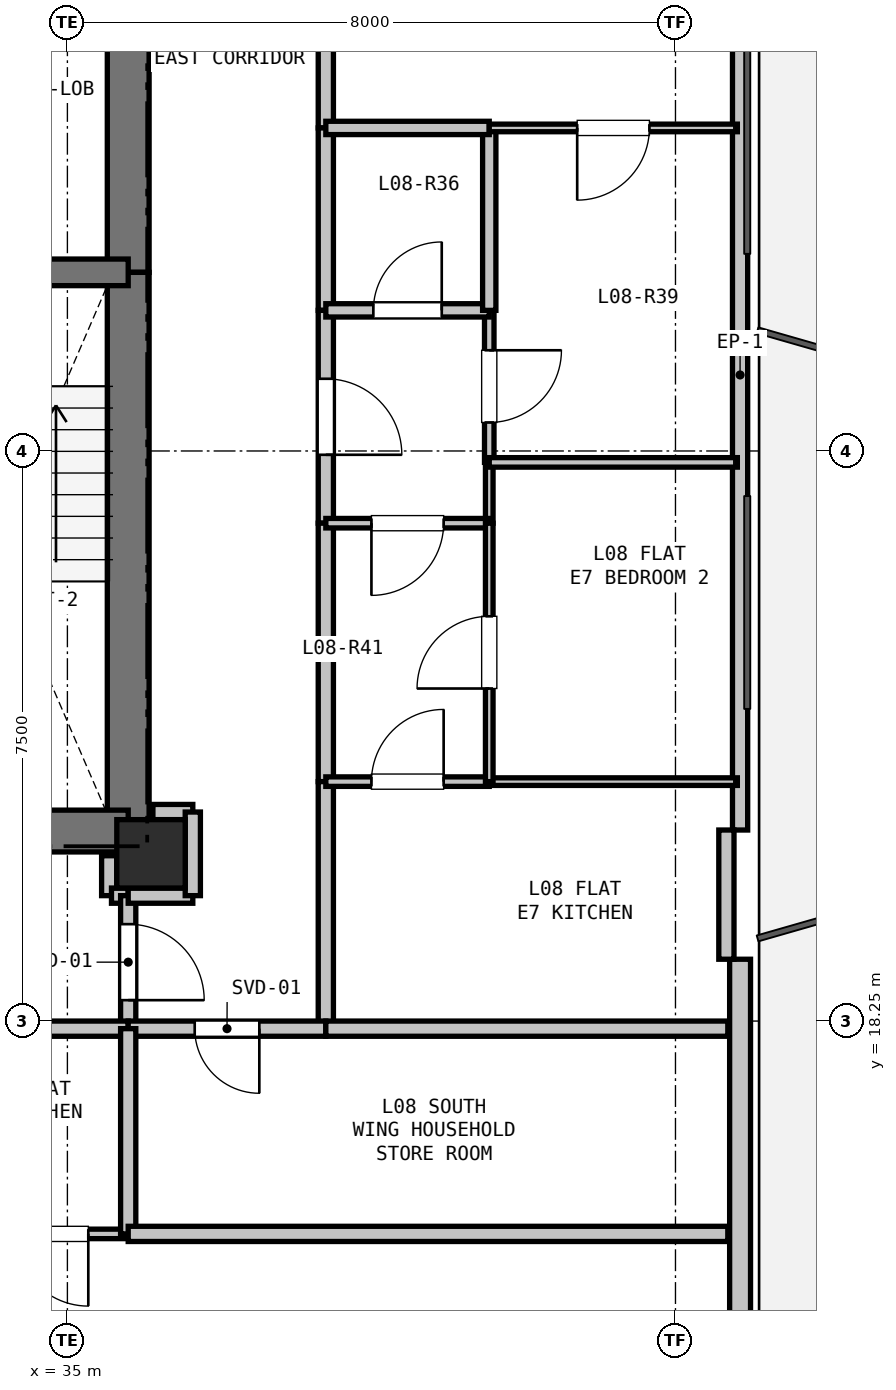
"""IFC4 building model, lengths in metres.
Left out: names, types, materials, properties, quantities, classifications, styles, units other than length and angle.
Written with IfcOpenShell. Run it as: python <this file> out.ifc"""

import sys

from ifc_helpers import new_model, si_unit, direction, frame, frame_2d, origin, origin_2d, place, context, subcontext, project, spatial, rectangle, extrude, element, fill, save


model = new_model("IFC4")
c1 = context("Model", 3, precision=1e-05, world=origin(), true_north=direction((0.0, 1.0)))
c2 = subcontext(c1, "Body", "Model", "MODEL_VIEW")
j1 = project(units=[si_unit("LENGTHUNIT", "METRE"), si_unit("PLANEANGLEUNIT", "RADIAN")], contexts=[c1])
p1 = place(None, origin())
s1 = spatial("IfcSite", under=j1, at=p1, CompositionType="ELEMENT")
p2 = place(p1, origin())
s2 = spatial("IfcBuilding", under=s1, at=p2, CompositionType="ELEMENT")
p3 = place(p2, frame((0.0, 0.0, 32.4)))
s3 = spatial("IfcBuildingStorey", under=s2, at=p3, CompositionType="ELEMENT", Elevation=32.4)
p4 = place(p3, frame((36.1, 20.45, 0.0), z_axis=(0.0, 0.0, 1.0), x_axis=(1.0, 0.0, 0.0)))
e1 = element("IfcColumn", 1, at=p4, inside=s3, PredefinedType="COLUMN", context=c2, shape_type="SweptSolid", body=[
    extrude(rectangle(XDim=0.9, YDim=0.9, at=origin_2d()), origin(), (0.0, 0.0, 1.0), 3.3),
])
p5 = place(p3, frame((43.85, 32.737, 0.0), z_axis=(0.0, 0.0, 1.0), x_axis=(0.0, -1.0, 0.0)))
e2 = element("IfcWall", 2, at=p5, inside=s3, PredefinedType="PARAPET", context=c2, shape_type="SweptSolid", body=[
    extrude(rectangle(XDim=11.973, YDim=0.2, at=frame_2d((5.987, 0.0))), origin(), (0.0, 0.0, 1.0), 0.2),
])
p6 = place(p3, frame((43.85, 19.063, 0.0), z_axis=(0.0, 0.0, 1.0), x_axis=(0.0, -1.0, 0.0)))
e3 = element("IfcWall", 3, at=p6, inside=s3, PredefinedType="SOLIDWALL", context=c2, shape_type="SweptSolid", body=[
    extrude(rectangle(XDim=12.673, YDim=0.275, at=frame_2d((6.336, 0.0))), origin(), (0.0, 0.0, 1.0), 2.66),
])
p7 = place(p3, frame((43.67, 20.763, 0.0), z_axis=(0.0, 0.0, 1.0), x_axis=(0.0, -1.0, 0.0)))
e4 = element("IfcWall", 4, at=p7, inside=s3, PredefinedType="PARAPET", context=c2, shape_type="SweptSolid", body=[
    extrude(rectangle(XDim=1.7, YDim=0.2, at=frame_2d((0.85, 0.0))), origin(), (0.0, 0.0, 1.0), 2.66),
])
p8 = place(p3, frame((35.8, 32.75, 0.0), z_axis=(0.0, 0.0, 1.0), x_axis=(0.0, -1.0, 0.0)))
e5 = element("IfcWall", 5, at=p8, inside=s3, PredefinedType="SHEAR", context=c2, shape_type="SweptSolid", body=[
    extrude(rectangle(XDim=4.65, YDim=0.55, at=frame_2d((2.325, 0.0))), origin(), (0.0, 0.0, 1.0), 3.04),
])
p9 = place(p3, frame((35.8, 28.1, 0.0), z_axis=(0.0, 0.0, 1.0), x_axis=(0.0, -1.0, 0.0)))
e6 = element("IfcWall", 6, at=p9, inside=s3, PredefinedType="SHEAR", context=c2, shape_type="SweptSolid", body=[
    extrude(rectangle(XDim=7.35, YDim=0.55, at=frame_2d((3.675, 0.0))), origin(), (0.0, 0.0, 1.0), 3.04),
])
p10 = place(p3, frame((35.8, 20.75, 0.0), z_axis=(0.0, 0.0, 1.0), x_axis=(-1.0, 0.0, 0.0)))
e7 = element("IfcWall", 7, at=p10, inside=s3, PredefinedType="SHEAR", context=c2, shape_type="SweptSolid", body=[
    extrude(rectangle(XDim=3.45, YDim=0.55, at=frame_2d((1.725, 0.0))), origin(), (0.0, 0.0, 1.0), 3.04),
])
p11 = place(p3, frame((32.35, 28.1, 0.0), z_axis=(0.0, 0.0, 1.0), x_axis=(1.0, 0.0, 0.0)))
e8 = element("IfcWall", 8, at=p11, inside=s3, PredefinedType="SHEAR", context=c2, shape_type="SweptSolid", body=[
    extrude(rectangle(XDim=3.45, YDim=0.35, at=frame_2d((1.725, 0.0))), origin(), (0.0, 0.0, 1.0), 3.04),
])
p12 = place(p11, frame((1.15, 0.0, 0.0)))
e9 = element("IfcOpeningElement", 9, at=p12, cuts=e8, PredefinedType="OPENING", context=c2, shape_type="SweptSolid", body=[
    extrude(rectangle(XDim=1.15, YDim=2.15, at=frame_2d((0.575, 1.075))), frame((0.0, 0.185, 0.0), z_axis=(0.0, -1.0, 0.0), x_axis=(1.0, 0.0, 0.0)), (0.0, 0.0, 1.0), 0.37),
])
p13 = place(p3, frame((35.55, 20.425, 0.0), z_axis=(0.0, 0.0, 1.0), x_axis=(0.0, -1.0, 0.0)))
e10 = element("IfcWall", 10, at=p13, inside=s3, PredefinedType="PARTITIONING", context=c2, shape_type="SweptSolid", body=[
    extrude(rectangle(XDim=0.525, YDim=0.2, at=frame_2d((0.263, 0.0))), origin(), (0.0, 0.0, 1.0), 2.488),
])
p14 = place(p3, frame((35.58, 19.9, 0.0), z_axis=(0.0, 0.0, 1.0), x_axis=(1.0, 0.0, 0.0)))
e11 = element("IfcWall", 11, at=p14, inside=s3, PredefinedType="PARTITIONING", context=c2, shape_type="SweptSolid", body=[
    extrude(rectangle(XDim=0.22, YDim=0.2, at=frame_2d((0.11, 0.0))), origin(), (0.0, 0.0, 1.0), 3.04),
])
p15 = place(p3, frame((35.8, 19.9, 0.0), z_axis=(0.0, 0.0, 1.0), x_axis=(0.0, -1.0, 0.0)))
e12 = element("IfcWall", 12, at=p15, inside=s3, PredefinedType="PARTITIONING", context=c2, shape_type="SweptSolid", body=[
    extrude(rectangle(XDim=1.75, YDim=0.2, at=frame_2d((0.875, 0.0))), origin(), (0.0, 0.0, 1.0), 3.04),
])
p16 = place(p15, frame((0.375, 0.0, 0.0)))
e13 = element("IfcOpeningElement", 13, at=p16, cuts=e12, PredefinedType="OPENING", context=c2, shape_type="SweptSolid", body=[
    extrude(rectangle(XDim=1.0, YDim=2.15, at=frame_2d((0.5, 1.075))), frame((0.0, 0.11, 0.0), z_axis=(0.0, -1.0, 0.0), x_axis=(1.0, 0.0, 0.0)), (0.0, 0.0, 1.0), 0.22),
])
p17 = place(p3, frame((35.8, 18.15, 0.0), z_axis=(0.0, 0.0, 1.0), x_axis=(-1.0, 0.0, 0.0)))
e14 = element("IfcWall", 14, at=p17, inside=s3, PredefinedType="PARTITIONING", context=c2, shape_type="SweptSolid", body=[
    extrude(rectangle(XDim=3.6, YDim=0.2, at=frame_2d((1.8, 0.0))), origin(), (0.0, 0.0, 1.0), 3.04),
])
p18 = place(p3, frame((36.65, 21.0, 0.0), z_axis=(0.0, 0.0, 1.0), x_axis=(-1.0, 0.0, 0.0)))
e15 = element("IfcWall", 15, at=p18, inside=s3, PredefinedType="PARTITIONING", context=c2, shape_type="SweptSolid", body=[
    extrude(rectangle(XDim=0.525, YDim=0.2, at=frame_2d((0.262, 0.0))), origin(), (0.0, 0.0, 1.0), 2.488),
])
p19 = place(p3, frame((38.4, 35.35, 0.0), z_axis=(0.0, 0.0, 1.0), x_axis=(0.0, -1.0, 0.0)))
e16 = element("IfcWall", 16, at=p19, inside=s3, PredefinedType="PARTITIONING", context=c2, shape_type="SweptSolid", body=[
    extrude(rectangle(XDim=5.35, YDim=0.2, at=frame_2d((2.675, 0.0))), origin(), (0.0, 0.0, 1.0), 2.338),
])
p20 = place(p3, frame((38.4, 30.0, 0.0), z_axis=(0.0, 0.0, 1.0), x_axis=(0.0, -1.0, 0.0)))
e17 = element("IfcWall", 17, at=p20, inside=s3, PredefinedType="PARTITIONING", context=c2, shape_type="SweptSolid", body=[
    extrude(rectangle(XDim=2.4, YDim=0.2, at=frame_2d((1.2, 0.0))), origin(), (0.0, 0.0, 1.0), 3.04),
])
p21 = place(p3, frame((38.4, 27.6, 0.0), z_axis=(0.0, 0.0, 1.0), x_axis=(0.0, -1.0, 0.0)))
e18 = element("IfcWall", 18, at=p21, inside=s3, PredefinedType="PARTITIONING", context=c2, shape_type="SweptSolid", body=[
    extrude(rectangle(XDim=2.8, YDim=0.2, at=frame_2d((1.4, 0.0))), origin(), (0.0, 0.0, 1.0), 3.04),
])
p22 = place(p21, frame((0.9, 0.0, 0.0)))
e19 = element("IfcOpeningElement", 19, at=p22, cuts=e18, PredefinedType="OPENING", context=c2, shape_type="SweptSolid", body=[
    extrude(rectangle(XDim=1.0, YDim=2.15, at=frame_2d((0.5, 1.075))), frame((0.0, 0.11, 0.0), z_axis=(0.0, -1.0, 0.0), x_axis=(1.0, 0.0, 0.0)), (0.0, 0.0, 1.0), 0.22),
])
p23 = place(p3, frame((38.4, 24.8, 0.0), z_axis=(0.0, 0.0, 1.0), x_axis=(0.0, -1.0, 0.0)))
e20 = element("IfcWall", 20, at=p23, inside=s3, PredefinedType="PARTITIONING", context=c2, shape_type="SweptSolid", body=[
    extrude(rectangle(XDim=3.4, YDim=0.2, at=frame_2d((1.7, 0.0))), origin(), (0.0, 0.0, 1.0), 3.04),
])
p24 = place(p3, frame((38.4, 21.4, 0.0), z_axis=(0.0, 0.0, 1.0), x_axis=(0.0, -1.0, 0.0)))
e21 = element("IfcWall", 21, at=p24, inside=s3, PredefinedType="PARTITIONING", context=c2, shape_type="SweptSolid", body=[
    extrude(rectangle(XDim=3.25, YDim=0.2, at=frame_2d((1.625, 0.0))), origin(), (0.0, 0.0, 1.0), 3.04),
])
p25 = place(p3, frame((38.4, 18.15, 0.0), z_axis=(0.0, 0.0, 1.0), x_axis=(-1.0, 0.0, 0.0)))
e22 = element("IfcWall", 22, at=p25, inside=s3, PredefinedType="PARTITIONING", context=c2, shape_type="SweptSolid", body=[
    extrude(rectangle(XDim=2.6, YDim=0.2, at=frame_2d((1.3, 0.0))), origin(), (0.0, 0.0, 1.0), 2.338),
])
p26 = place(p25, frame((0.875, 0.0, 0.0)))
e23 = element("IfcOpeningElement", 23, at=p26, cuts=e22, PredefinedType="OPENING", context=c2, shape_type="SweptSolid", body=[
    extrude(rectangle(XDim=0.85, YDim=2.1, at=frame_2d((0.425, 1.05))), frame((0.0, 0.11, 0.0), z_axis=(0.0, -1.0, 0.0), x_axis=(1.0, 0.0, 0.0)), (0.0, 0.0, 1.0), 0.22),
])
p27 = place(p3, frame((35.8, 19.9, 0.0), z_axis=(0.0, 0.0, 1.0), x_axis=(1.0, 0.0, 0.0)))
e24 = element("IfcWall", 24, at=p27, inside=s3, PredefinedType="PARTITIONING", context=c2, shape_type="SweptSolid", body=[
    extrude(rectangle(XDim=0.85, YDim=0.2, at=frame_2d((0.425, 0.0))), origin(), (0.0, 0.0, 1.0), 2.338),
])
p28 = place(p3, frame((36.65, 19.9, 0.0), z_axis=(0.0, 0.0, 1.0), x_axis=(0.0, 1.0, 0.0)))
e25 = element("IfcWall", 25, at=p28, inside=s3, PredefinedType="PARTITIONING", context=c2, shape_type="SweptSolid", body=[
    extrude(rectangle(XDim=1.1, YDim=0.2, at=frame_2d((0.55, 0.0))), origin(), (0.0, 0.0, 1.0), 3.04),
])
p29 = place(p3, frame((40.55, 27.6, 0.0), z_axis=(0.0, 0.0, 1.0), x_axis=(0.0, -1.0, 0.0)))
e26 = element("IfcWall", 26, at=p29, inside=s3, PredefinedType="PARTITIONING", context=c2, shape_type="SweptSolid", body=[
    extrude(rectangle(XDim=2.0, YDim=0.125, at=frame_2d((1.0, 0.0))), origin(), (0.0, 0.0, 1.0), 3.04),
])
p30 = place(p29, frame((0.525, 0.0, 0.0)))
e27 = element("IfcOpeningElement", 27, at=p30, cuts=e26, PredefinedType="OPENING", context=c2, shape_type="SweptSolid", body=[
    extrude(rectangle(XDim=0.95, YDim=2.1, at=frame_2d((0.475, 1.05))), frame((0.0, 0.073, 0.0), z_axis=(0.0, -1.0, 0.0), x_axis=(1.0, 0.0, 0.0)), (0.0, 0.0, 1.0), 0.145),
])
p31 = place(p3, frame((40.55, 25.6, 0.0), z_axis=(0.0, 0.0, 1.0), x_axis=(0.0, -1.0, 0.0)))
e28 = element("IfcWall", 28, at=p31, inside=s3, PredefinedType="PARTITIONING", context=c2, shape_type="SweptSolid", body=[
    extrude(rectangle(XDim=0.8, YDim=0.1, at=frame_2d((0.4, 0.0))), origin(), (0.0, 0.0, 1.0), 3.04),
])
p32 = place(p3, frame((40.55, 24.8, 0.0), z_axis=(0.0, 0.0, 1.0), x_axis=(-1.0, 0.0, 0.0)))
e29 = element("IfcWall", 29, at=p32, inside=s3, PredefinedType="PARTITIONING", context=c2, shape_type="SweptSolid", body=[
    extrude(rectangle(XDim=2.15, YDim=0.125, at=frame_2d((1.075, 0.0))), origin(), (0.0, 0.0, 1.0), 3.04),
])
p33 = place(p32, frame((0.6, 0.0, 0.0)))
e30 = element("IfcOpeningElement", 30, at=p33, cuts=e29, PredefinedType="OPENING", context=c2, shape_type="SweptSolid", body=[
    extrude(rectangle(XDim=0.95, YDim=2.1, at=frame_2d((0.475, 1.05))), frame((0.0, 0.073, 0.0), z_axis=(0.0, -1.0, 0.0), x_axis=(1.0, 0.0, 0.0)), (0.0, 0.0, 1.0), 0.145),
])
p34 = place(p3, frame((38.4, 27.6, 0.0), z_axis=(0.0, 0.0, 1.0), x_axis=(1.0, 0.0, 0.0)))
e31 = element("IfcWall", 31, at=p34, inside=s3, PredefinedType="PLUMBINGWALL", context=c2, shape_type="SweptSolid", body=[
    extrude(rectangle(XDim=2.15, YDim=0.175, at=frame_2d((1.075, 0.0))), origin(), (0.0, 0.0, 1.0), 3.04),
])
p35 = place(p34, frame((0.625, 0.0, 0.0)))
e32 = element("IfcOpeningElement", 32, at=p35, cuts=e31, PredefinedType="OPENING", context=c2, shape_type="SweptSolid", body=[
    extrude(rectangle(XDim=0.9, YDim=2.1, at=frame_2d((0.45, 1.05))), frame((0.0, 0.097, 0.0), z_axis=(0.0, -1.0, 0.0), x_axis=(1.0, 0.0, 0.0)), (0.0, 0.0, 1.0), 0.195),
])
p36 = place(p3, frame((35.8, 15.45, 0.0), z_axis=(0.0, 0.0, 1.0), x_axis=(-1.0, 0.0, 0.0)))
e33 = element("IfcWall", 33, at=p36, inside=s3, PredefinedType="PARTITIONING", context=c2, shape_type="SweptSolid", body=[
    extrude(rectangle(XDim=2.0, YDim=0.125, at=frame_2d((1.0, 0.0))), origin(), (0.0, 0.0, 1.0), 3.04),
])
p37 = place(p36, frame((0.525, 0.0, 0.0)))
e34 = element("IfcOpeningElement", 34, at=p37, cuts=e33, PredefinedType="OPENING", context=c2, shape_type="SweptSolid", body=[
    extrude(rectangle(XDim=0.95, YDim=2.1, at=frame_2d((0.475, 1.05))), frame((0.0, 0.073, 0.0), z_axis=(0.0, -1.0, 0.0), x_axis=(1.0, 0.0, 0.0)), (0.0, 0.0, 1.0), 0.145),
])
p38 = place(p3, frame((35.8, 18.15, 0.0), z_axis=(0.0, 0.0, 1.0), x_axis=(0.0, -1.0, 0.0)))
e35 = element("IfcWall", 35, at=p38, inside=s3, PredefinedType="PARTITIONING", context=c2, shape_type="SweptSolid", body=[
    extrude(rectangle(XDim=2.7, YDim=0.2, at=frame_2d((1.35, 0.0))), origin(), (0.0, 0.0, 1.0), 3.04),
])
p39 = place(p3, frame((40.55, 30.0, 0.0), z_axis=(0.0, 0.0, 1.0), x_axis=(0.0, -1.0, 0.0)))
e36 = element("IfcWall", 36, at=p39, inside=s3, PredefinedType="PLUMBINGWALL", context=c2, shape_type="SweptSolid", body=[
    extrude(rectangle(XDim=2.4, YDim=0.175, at=frame_2d((1.2, 0.0))), origin(), (0.0, 0.0, 1.0), 3.04),
])
p40 = place(p3, frame((38.4, 30.0, 0.0), z_axis=(0.0, 0.0, 1.0), x_axis=(1.0, 0.0, 0.0)))
e37 = element("IfcWall", 37, at=p40, inside=s3, PredefinedType="PLUMBINGWALL", context=c2, shape_type="SweptSolid", body=[
    extrude(rectangle(XDim=2.15, YDim=0.175, at=frame_2d((1.075, 0.0))), origin(), (0.0, 0.0, 1.0), 3.04),
])
p41 = place(p3, frame((38.4, 21.4, 0.0), z_axis=(0.0, 0.0, 1.0), x_axis=(1.0, 0.0, 0.0)))
e38 = element("IfcWall", 38, at=p41, inside=s3, PredefinedType="PARTITIONING", context=c2, shape_type="SweptSolid", body=[
    extrude(rectangle(XDim=2.15, YDim=0.125, at=frame_2d((1.075, 0.0))), origin(), (0.0, 0.0, 1.0), 3.04),
])
p42 = place(p41, frame((0.6, 0.0, 0.0)))
e39 = element("IfcOpeningElement", 39, at=p42, cuts=e38, PredefinedType="OPENING", context=c2, shape_type="SweptSolid", body=[
    extrude(rectangle(XDim=0.95, YDim=2.1, at=frame_2d((0.475, 1.05))), frame((0.0, 0.073, 0.0), z_axis=(0.0, -1.0, 0.0), x_axis=(1.0, 0.0, 0.0)), (0.0, 0.0, 1.0), 0.145),
])
p43 = place(p3, frame((40.55, 21.4, 0.0), z_axis=(0.0, 0.0, 1.0), x_axis=(1.0, 0.0, 0.0)))
e40 = element("IfcWall", 40, at=p43, inside=s3, PredefinedType="PARTITIONING", context=c2, shape_type="SweptSolid", body=[
    extrude(rectangle(XDim=3.264, YDim=0.1, at=frame_2d((1.632, 0.0))), origin(), (0.0, 0.0, 1.0), 2.365),
])
p44 = place(p3, frame((43.688, 18.15, 0.0), z_axis=(0.0, 0.0, 1.0), x_axis=(-1.0, 0.0, 0.0)))
e41 = element("IfcWall", 41, at=p44, inside=s3, PredefinedType="PARTITIONING", context=c2, shape_type="SweptSolid", body=[
    extrude(rectangle(XDim=5.289, YDim=0.2, at=frame_2d((2.644, 0.0))), origin(), (0.0, 0.0, 1.0), 2.365),
])
p45 = place(p3, frame((43.688, 15.45, 0.0), z_axis=(0.0, 0.0, 1.0), x_axis=(-1.0, 0.0, 0.0)))
e42 = element("IfcWall", 42, at=p45, inside=s3, PredefinedType="PARTITIONING", context=c2, shape_type="SweptSolid", body=[
    extrude(rectangle(XDim=7.888, YDim=0.2, at=frame_2d((3.944, 0.0))), origin(), (0.0, 0.0, 1.0), 2.338),
])
p46 = place(p3, frame((43.814, 30.0, 0.0), z_axis=(0.0, 0.0, 1.0), x_axis=(-1.0, 0.0, 0.0)))
e43 = element("IfcWall", 43, at=p46, inside=s3, PredefinedType="PARTITIONING", context=c2, shape_type="SweptSolid", body=[
    extrude(rectangle(XDim=3.264, YDim=0.1, at=frame_2d((1.632, 0.0))), origin(), (0.0, 0.0, 1.0), 2.365),
])
p47 = place(p46, frame((1.157, 0.0, 0.0)))
e44 = element("IfcOpeningElement", 44, at=p47, cuts=e43, PredefinedType="OPENING", context=c2, shape_type="SweptSolid", body=[
    extrude(rectangle(XDim=0.95, YDim=2.1, at=frame_2d((0.475, 1.05))), frame((0.0, 0.06, 0.0), z_axis=(0.0, -1.0, 0.0), x_axis=(1.0, 0.0, 0.0)), (0.0, 0.0, 1.0), 0.12),
])
p48 = place(p3, frame((43.814, 25.6, 0.0), z_axis=(0.0, 0.0, 1.0), x_axis=(-1.0, 0.0, 0.0)))
e45 = element("IfcWall", 45, at=p48, inside=s3, PredefinedType="PARTITIONING", context=c2, shape_type="SweptSolid", body=[
    extrude(rectangle(XDim=3.264, YDim=0.125, at=frame_2d((1.632, 0.0))), origin(), (0.0, 0.0, 1.0), 2.365),
])
p49 = place(p3, frame((40.55, 21.4, 0.0), z_axis=(0.0, 0.0, 1.0), x_axis=(0.0, 1.0, 0.0)))
e46 = element("IfcWall", 46, at=p49, inside=s3, PredefinedType="PARTITIONING", context=c2, shape_type="SweptSolid", body=[
    extrude(rectangle(XDim=3.4, YDim=0.1, at=frame_2d((1.7, 0.0))), origin(), (0.0, 0.0, 1.0), 3.04),
])
p50 = place(p49, frame((1.225, 0.0, 0.0)))
e47 = element("IfcOpeningElement", 47, at=p50, cuts=e46, PredefinedType="OPENING", context=c2, shape_type="SweptSolid", body=[
    extrude(rectangle(XDim=0.95, YDim=2.1, at=frame_2d((0.475, 1.05))), frame((0.0, 0.06, 0.0), z_axis=(0.0, -1.0, 0.0), x_axis=(1.0, 0.0, 0.0)), (0.0, 0.0, 1.0), 0.12),
])
p51 = place(p16, origin())
e48 = element("IfcDoor", 48, at=p51, inside=s3, OperationType="SINGLE_SWING_RIGHT", PredefinedType="DOOR", context=c2, shape_type="SweptSolid", body=[
    extrude(rectangle(XDim=1.0, YDim=2.15, at=frame_2d((0.5, 1.075))), frame((0.0, 0.025, 0.0), z_axis=(0.0, -1.0, 0.0), x_axis=(1.0, 0.0, 0.0)), (0.0, 0.0, 1.0), 0.05),
])
fill(e13, e48)
p52 = place(p22, origin())
e49 = element("IfcDoor", 49, at=p52, inside=s3, OperationType="SINGLE_SWING_RIGHT", PredefinedType="DOOR", context=c2, shape_type="SweptSolid", body=[
    extrude(rectangle(XDim=1.0, YDim=2.15, at=frame_2d((0.5, 1.075))), frame((0.0, 0.025, 0.0), z_axis=(0.0, -1.0, 0.0), x_axis=(1.0, 0.0, 0.0)), (0.0, 0.0, 1.0), 0.05),
])
fill(e19, e49)
p53 = place(p26, origin())
e50 = element("IfcDoor", 50, at=p53, inside=s3, OperationType="SINGLE_SWING_LEFT", PredefinedType="DOOR", context=c2, shape_type="SweptSolid", body=[
    extrude(rectangle(XDim=0.85, YDim=2.1, at=frame_2d((0.425, 1.05))), frame((0.0, 0.025, 0.0), z_axis=(0.0, -1.0, 0.0), x_axis=(1.0, 0.0, 0.0)), (0.0, 0.0, 1.0), 0.05),
])
fill(e23, e50)
p54 = place(p35, origin())
e51 = element("IfcDoor", 51, at=p54, inside=s3, OperationType="SINGLE_SWING_RIGHT", PredefinedType="DOOR", context=c2, shape_type="SweptSolid", body=[
    extrude(rectangle(XDim=0.9, YDim=2.1, at=frame_2d((0.45, 1.05))), frame((0.0, 0.025, 0.0), z_axis=(0.0, -1.0, 0.0), x_axis=(1.0, 0.0, 0.0)), (0.0, 0.0, 1.0), 0.05),
])
fill(e32, e51)
p55 = place(p30, origin())
e52 = element("IfcDoor", 52, at=p55, inside=s3, OperationType="SINGLE_SWING_LEFT", PredefinedType="DOOR", context=c2, shape_type="SweptSolid", body=[
    extrude(rectangle(XDim=0.95, YDim=2.1, at=frame_2d((0.475, 1.05))), frame((0.0, 0.025, 0.0), z_axis=(0.0, -1.0, 0.0), x_axis=(1.0, 0.0, 0.0)), (0.0, 0.0, 1.0), 0.05),
])
fill(e27, e52)
p56 = place(p33, origin())
e53 = element("IfcDoor", 53, at=p56, inside=s3, OperationType="SINGLE_SWING_RIGHT", PredefinedType="DOOR", context=c2, shape_type="SweptSolid", body=[
    extrude(rectangle(XDim=0.95, YDim=2.1, at=frame_2d((0.475, 1.05))), frame((0.0, 0.025, 0.0), z_axis=(0.0, -1.0, 0.0), x_axis=(1.0, 0.0, 0.0)), (0.0, 0.0, 1.0), 0.05),
])
fill(e30, e53)
p57 = place(p37, origin())
e54 = element("IfcDoor", 54, at=p57, inside=s3, OperationType="SINGLE_SWING_LEFT", PredefinedType="DOOR", context=c2, shape_type="SweptSolid", body=[
    extrude(rectangle(XDim=0.95, YDim=2.1, at=frame_2d((0.475, 1.05))), frame((0.0, 0.025, 0.0), z_axis=(0.0, -1.0, 0.0), x_axis=(1.0, 0.0, 0.0)), (0.0, 0.0, 1.0), 0.05),
])
fill(e34, e54)
p58 = place(p42, origin())
e55 = element("IfcDoor", 55, at=p58, inside=s3, OperationType="SINGLE_SWING_RIGHT", PredefinedType="DOOR", context=c2, shape_type="SweptSolid", body=[
    extrude(rectangle(XDim=0.95, YDim=2.1, at=frame_2d((0.475, 1.05))), frame((0.0, 0.025, 0.0), z_axis=(0.0, -1.0, 0.0), x_axis=(1.0, 0.0, 0.0)), (0.0, 0.0, 1.0), 0.05),
])
fill(e39, e55)
p59 = place(p47, origin())
e56 = element("IfcDoor", 56, at=p59, inside=s3, OperationType="SINGLE_SWING_RIGHT", PredefinedType="DOOR", context=c2, shape_type="SweptSolid", body=[
    extrude(rectangle(XDim=0.95, YDim=2.1, at=frame_2d((0.475, 1.05))), frame((0.0, 0.025, 0.0), z_axis=(0.0, -1.0, 0.0), x_axis=(1.0, 0.0, 0.0)), (0.0, 0.0, 1.0), 0.05),
])
fill(e44, e56)
p60 = place(p50, origin())
e57 = element("IfcDoor", 57, at=p60, inside=s3, OperationType="SINGLE_SWING_LEFT", PredefinedType="DOOR", context=c2, shape_type="SweptSolid", body=[
    extrude(rectangle(XDim=0.95, YDim=2.1, at=frame_2d((0.475, 1.05))), frame((0.0, 0.025, 0.0), z_axis=(0.0, -1.0, 0.0), x_axis=(1.0, 0.0, 0.0)), (0.0, 0.0, 1.0), 0.05),
])
fill(e47, e57)
save(model, sys.argv[1])
